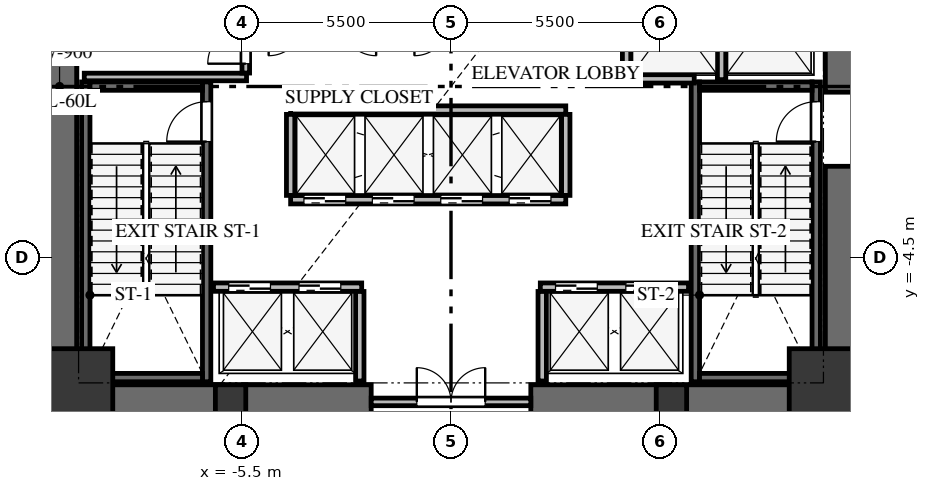
"""IFC4 building model, lengths in metres.
Left out: names, types, materials, properties, quantities, classifications, styles, units other than length and angle.
Written with IfcOpenShell. Run it as: python <this file> out.ifc"""

import sys

from ifc_helpers import new_model, si_unit, direction, frame, frame_2d, origin, origin_2d, place, context, subcontext, project, spatial, rectangle, extrude, source, transform, mapped, element, fill, save


model = new_model("IFC4")
c1 = context("Model", 3, precision=1e-05, world=origin(), true_north=direction((0.0, 1.0)))
c2 = subcontext(c1, "Body", "Model", "MODEL_VIEW")
j1 = project(units=[si_unit("LENGTHUNIT", "METRE"), si_unit("PLANEANGLEUNIT", "RADIAN")], contexts=[c1])
p1 = place(None, origin())
s1 = spatial("IfcSite", under=j1, at=p1, CompositionType="ELEMENT")
p2 = place(p1, origin())
s2 = spatial("IfcBuilding", under=s1, at=p2, CompositionType="ELEMENT")
p3 = place(p2, origin())
s3 = spatial("IfcBuildingStorey", under=s2, at=p3, CompositionType="ELEMENT", Elevation=0.0)
p4 = place(p3, frame((-10.3, -8.75, 0.0), z_axis=(0.0, 0.0, 1.0), x_axis=(0.0, 1.0, 0.0)))
e1 = element("IfcWall", 1, at=p4, inside=s3, PredefinedType="SHEAR", context=c2, shape_type="SweptSolid", body=[
    extrude(rectangle(XDim=17.5, YDim=0.9, at=frame_2d((8.75, 0.0))), origin(), (0.0, 0.0, 1.0), 5.2),
])
p5 = place(p3, frame((10.3, -8.75, 0.0), z_axis=(0.0, 0.0, 1.0), x_axis=(0.0, 1.0, 0.0)))
e2 = element("IfcWall", 2, at=p5, inside=s3, PredefinedType="SHEAR", context=c2, shape_type="SweptSolid", body=[
    extrude(rectangle(XDim=6.65, YDim=0.9, at=frame_2d((3.325, 0.0))), origin(), (0.0, 0.0, 1.0), 5.2),
])
p6 = place(p3, frame((10.3, -0.15, 0.0), z_axis=(0.0, 0.0, 1.0), x_axis=(0.0, 1.0, 0.0)))
e3 = element("IfcWall", 3, at=p6, inside=s3, PredefinedType="SHEAR", context=c2, shape_type="SweptSolid", body=[
    extrude(rectangle(XDim=8.9, YDim=0.9, at=frame_2d((4.45, 0.0))), origin(), (0.0, 0.0, 1.0), 5.2),
])
for number, where, z_axis, x_axis in (
    (4, (-9.85, -8.3, 0.0), (0.0, 0.0, 1.0), (1.0, 0.0, 0.0)),
    (5, (2.1, -8.3, 0.0), (0.0, 0.0, 1.0), (1.0, 0.0, 0.0)),
):
    element("IfcWall", number, at=place(p3, frame(where, z_axis=z_axis, x_axis=x_axis)), inside=s3, PredefinedType="SHEAR", context=c2, shape_type="SweptSolid", body=[
        extrude(rectangle(XDim=7.75, YDim=0.9, at=frame_2d((3.875, 0.0))), origin(), (0.0, 0.0, 1.0), 5.2),
    ])
p7 = place(p3, frame((-6.43, -7.77, -0.3), z_axis=(0.0, 0.0, 1.0), x_axis=(0.0, 1.0, 0.0)))
e6 = element("IfcWall", 6, at=p7, inside=s3, PredefinedType="SHEAR", context=c2, shape_type="SweptSolid", body=[
    extrude(rectangle(XDim=7.89, YDim=0.22, at=frame_2d((3.945, 0.0))), origin(), (0.0, 0.0, 1.0), 5.2),
])
p8 = place(p7, frame((6.32, 0.0, 0.0)))
e7 = element("IfcOpeningElement", 7, at=p8, cuts=e6, PredefinedType="OPENING", context=c2, shape_type="SweptSolid", body=[
    extrude(rectangle(XDim=1.05, YDim=2.15, at=frame_2d((0.525, 1.075))), frame((0.0, 0.12, 0.0), z_axis=(0.0, -1.0, 0.0), x_axis=(1.0, 0.0, 0.0)), (0.0, 0.0, 1.0), 0.24),
])
p9 = place(p3, frame((-9.61, 0.12, -0.3), z_axis=(0.0, 0.0, 1.0), x_axis=(0.0, -1.0, 0.0)))
e8 = element("IfcWall", 8, at=p9, inside=s3, PredefinedType="SHEAR", context=c2, shape_type="SweptSolid", body=[
    extrude(rectangle(XDim=7.89, YDim=0.22, at=frame_2d((3.945, 0.0))), origin(), (0.0, 0.0, 1.0), 5.2),
])
for number, where, z_axis, x_axis in (
    (9, (-9.5, -7.66, -0.3), (0.0, 0.0, 1.0), (1.0, 0.0, 0.0)),
    (10, (-6.54, 0.01, -0.3), (0.0, 0.0, 1.0), (-1.0, 0.0, 0.0)),
):
    element("IfcWall", number, at=place(p3, frame(where, z_axis=z_axis, x_axis=x_axis)), inside=s3, PredefinedType="SHEAR", context=c2, shape_type="SweptSolid", body=[
        extrude(rectangle(XDim=2.96, YDim=0.22, at=frame_2d((1.48, 0.0))), origin(), (0.0, 0.0, 1.0), 5.2),
    ])
p10 = place(p3, frame((9.61, -7.77, -0.3), z_axis=(0.0, 0.0, 1.0), x_axis=(0.0, 1.0, 0.0)))
e11 = element("IfcWall", 11, at=p10, inside=s3, PredefinedType="SHEAR", context=c2, shape_type="SweptSolid", body=[
    extrude(rectangle(XDim=7.89, YDim=0.22, at=frame_2d((3.945, 0.0))), origin(), (0.0, 0.0, 1.0), 5.2),
])
p11 = place(p10, frame((6.32, 0.0, 0.0)))
e12 = element("IfcOpeningElement", 12, at=p11, cuts=e11, PredefinedType="OPENING", context=c2, shape_type="SweptSolid", body=[
    extrude(rectangle(XDim=1.05, YDim=2.15, at=frame_2d((0.525, 1.075))), frame((0.0, 0.12, 0.0), z_axis=(0.0, -1.0, 0.0), x_axis=(1.0, 0.0, 0.0)), (0.0, 0.0, 1.0), 0.24),
])
p12 = place(p3, frame((6.43, 0.12, -0.3), z_axis=(0.0, 0.0, 1.0), x_axis=(0.0, -1.0, 0.0)))
e13 = element("IfcWall", 13, at=p12, inside=s3, PredefinedType="SHEAR", context=c2, shape_type="SweptSolid", body=[
    extrude(rectangle(XDim=7.89, YDim=0.22, at=frame_2d((3.945, 0.0))), origin(), (0.0, 0.0, 1.0), 5.2),
])
for number, where, z_axis, x_axis in (
    (14, (6.54, -7.66, -0.3), (0.0, 0.0, 1.0), (1.0, 0.0, 0.0)),
    (15, (9.5, 0.01, -0.3), (0.0, 0.0, 1.0), (-1.0, 0.0, 0.0)),
):
    element("IfcWall", number, at=place(p3, frame(where, z_axis=z_axis, x_axis=x_axis)), inside=s3, PredefinedType="SHEAR", context=c2, shape_type="SweptSolid", body=[
        extrude(rectangle(XDim=2.96, YDim=0.22, at=frame_2d((1.48, 0.0))), origin(), (0.0, 0.0, 1.0), 5.2),
    ])
m1 = source(origin(), c2, "Body", "SweptSolid", [
    extrude(rectangle(XDim=1.8, YDim=1.8, at=origin_2d()), origin(), (0.0, 0.0, 1.0), 5.2),
])
for number, where, z_axis, x_axis in (
    (16, (-9.8, -7.8, -0.3), (0.0, 0.0, 1.0), (1.0, 0.0, 0.0)),
    (17, (9.8, -7.8, -0.3), (0.0, 0.0, 1.0), (1.0, 0.0, 0.0)),
):
    element("IfcColumn", number, at=place(p3, frame(where, z_axis=z_axis, x_axis=x_axis)), inside=s3, PredefinedType="COLUMN", context=c2, shape_type="MappedRepresentation", body=[
        mapped(m1, transform((0.0, 0.0, 0.0), x_axis=(1.0, 0.0, 0.0), y_axis=(0.0, 1.0, 0.0), z_axis=(0.0, 0.0, 1.0), scale=1.0)),
    ])
m2 = source(origin(), c2, "Body", "SweptSolid", [
    extrude(rectangle(XDim=0.8, YDim=0.8, at=origin_2d()), origin(), (0.0, 0.0, 1.0), 5.2),
])
for number, where, z_axis, x_axis in (
    (18, (-5.8, -8.25, -0.3), (0.0, 0.0, 1.0), (1.0, 0.0, 0.0)),
    (19, (5.8, -8.25, -0.3), (0.0, 0.0, 1.0), (1.0, 0.0, 0.0)),
):
    element("IfcColumn", number, at=place(p3, frame(where, z_axis=z_axis, x_axis=x_axis)), inside=s3, PredefinedType="PILASTER", context=c2, shape_type="MappedRepresentation", body=[
        mapped(m2, transform((0.0, 0.0, 0.0), x_axis=(1.0, 0.0, 0.0), y_axis=(0.0, 1.0, 0.0), z_axis=(0.0, 0.0, 1.0), scale=1.0)),
    ])
p13 = place(p3, frame((20.589, -1.538, 0.0), z_axis=(0.0, 0.0, 1.0), x_axis=(-0.603015201292, -0.797729695455, 0.0)))
e20 = element("IfcWall", 20, at=p13, inside=s3, PredefinedType="SOLIDWALL", context=c2, shape_type="SweptSolid", body=[
    extrude(rectangle(XDim=16.65, YDim=0.3, at=frame_2d((8.325, 0.0))), origin(), (0.0, 0.0, 1.0), 4.9),
])
p14 = place(p13, frame((4.2, 0.0, 0.0)))
e21 = element("IfcOpeningElement", 21, at=p14, cuts=e20, PredefinedType="OPENING", context=c2, shape_type="SweptSolid", body=[
    extrude(rectangle(XDim=2.0, YDim=2.3, at=frame_2d((1.0, 1.15))), frame((0.0, 0.16, 0.0), z_axis=(0.0, -1.0, 0.0), x_axis=(1.0, 0.0, 0.0)), (0.0, 0.0, 1.0), 0.32),
])
p15 = place(p3, frame((-2.1, -8.3, 0.0), z_axis=(0.0, 0.0, 1.0), x_axis=(1.0, 0.0, 0.0)))
e22 = element("IfcWall", 22, at=p15, inside=s3, PredefinedType="SOLIDWALL", context=c2, shape_type="SweptSolid", body=[
    extrude(rectangle(XDim=4.2, YDim=0.2, at=frame_2d((2.1, 0.0))), origin(), (0.0, 0.0, 1.0), 4.885),
])
p16 = place(p15, frame((1.2, 0.0, 0.0)))
e23 = element("IfcOpeningElement", 23, at=p16, cuts=e22, PredefinedType="OPENING", context=c2, shape_type="SweptSolid", body=[
    extrude(rectangle(XDim=1.8, YDim=2.15, at=frame_2d((0.9, 1.075))), frame((0.0, 0.11, 0.0), z_axis=(0.0, -1.0, 0.0), x_axis=(1.0, 0.0, 0.0)), (0.0, 0.0, 1.0), 0.22),
])
p17 = place(p3, frame((-9.65, 0.25, 0.0), z_axis=(0.0, 0.0, 1.0), x_axis=(1.0, 0.0, 0.0)))
e24 = element("IfcWall", 24, at=p17, inside=s3, PredefinedType="SOLIDWALL", context=c2, shape_type="SweptSolid", body=[
    extrude(rectangle(XDim=4.27, YDim=0.2, at=frame_2d((2.135, 0.0))), origin(), (0.0, 0.0, 1.0), 4.885),
])
p18 = place(p3, frame((-5.4, 0.354, 0.0), z_axis=(0.0, 0.0, 1.0), x_axis=(0.0, 1.0, 0.0)))
e25 = element("IfcWall", 25, at=p18, inside=s3, PredefinedType="SOLIDWALL", context=c2, shape_type="SweptSolid", body=[
    extrude(rectangle(XDim=4.026, YDim=0.2, at=frame_2d((2.013, 0.0))), origin(), (0.0, 0.0, 1.0), 4.885),
])
p19 = place(p18, frame((0.246, 0.0, 0.0)))
e26 = element("IfcOpeningElement", 26, at=p19, cuts=e25, PredefinedType="OPENING", context=c2, shape_type="SweptSolid", body=[
    extrude(rectangle(XDim=1.0, YDim=2.15, at=frame_2d((0.5, 1.075))), frame((0.0, 0.11, 0.0), z_axis=(0.0, -1.0, 0.0), x_axis=(1.0, 0.0, 0.0)), (0.0, 0.0, 1.0), 0.22),
])
for number, where, z_axis, x_axis in (
    (27, (4.62, 0.18, 0.0), (0.0, 0.0, 1.0), (0.0, 1.0, 0.0)),
    (28, (7.12, 0.18, 0.0), (0.0, 0.0, 1.0), (0.0, 1.0, 0.0)),
):
    element("IfcWall", number, at=place(p3, frame(where, z_axis=z_axis, x_axis=x_axis)), inside=s3, PredefinedType="SOLIDWALL", context=c2, shape_type="SweptSolid", body=[
        extrude(rectangle(XDim=3.186, YDim=0.22, at=frame_2d((1.593, 0.0))), origin(), (0.0, 0.0, 1.0), 4.885),
    ])
p20 = place(p3, frame((4.734, 0.2, 0.0), z_axis=(0.0, 0.0, 1.0), x_axis=(1.0, 0.0, 0.0)))
e29 = element("IfcWall", 29, at=p20, inside=s3, PredefinedType="SOLIDWALL", context=c2, shape_type="SweptSolid", body=[
    extrude(rectangle(XDim=1.666, YDim=0.22, at=frame_2d((0.833, 0.0))), origin(), (0.0, 0.0, 1.0), 4.885),
])
p21 = place(p3, frame((-6.25, -5.28, 0.0), z_axis=(0.0, 0.0, 1.0), x_axis=(1.0, 0.0, 0.0)))
e30 = element("IfcWall", 30, at=p21, inside=s3, PredefinedType="SOLIDWALL", context=c2, shape_type="SweptSolid", body=[
    extrude(rectangle(XDim=3.9, YDim=0.22, at=frame_2d((1.95, 0.0))), origin(), (0.0, 0.0, 1.0), 4.885),
])
p22 = place(p21, frame((0.4, 0.0, 0.0)))
e31 = element("IfcOpeningElement", 31, at=p22, cuts=e30, PredefinedType="OPENING", context=c2, shape_type="SweptSolid", body=[
    extrude(rectangle(XDim=1.1, YDim=2.15, at=frame_2d((0.55, 1.075))), frame((0.0, 0.12, 0.0), z_axis=(0.0, -1.0, 0.0), x_axis=(1.0, 0.0, 0.0)), (0.0, 0.0, 1.0), 0.24),
])
p23 = place(p21, frame((2.25, 0.0, 0.0)))
e32 = element("IfcOpeningElement", 32, at=p23, cuts=e30, PredefinedType="OPENING", context=c2, shape_type="SweptSolid", body=[
    extrude(rectangle(XDim=1.1, YDim=2.15, at=frame_2d((0.55, 1.075))), frame((0.0, 0.12, 0.0), z_axis=(0.0, -1.0, 0.0), x_axis=(1.0, 0.0, 0.0)), (0.0, 0.0, 1.0), 0.24),
])
p24 = place(p3, frame((2.35, -5.28, 0.0), z_axis=(0.0, 0.0, 1.0), x_axis=(1.0, 0.0, 0.0)))
e33 = element("IfcWall", 33, at=p24, inside=s3, PredefinedType="SOLIDWALL", context=c2, shape_type="SweptSolid", body=[
    extrude(rectangle(XDim=3.9, YDim=0.22, at=frame_2d((1.95, 0.0))), origin(), (0.0, 0.0, 1.0), 4.885),
])
p25 = place(p24, frame((0.4, 0.0, 0.0)))
e34 = element("IfcOpeningElement", 34, at=p25, cuts=e33, PredefinedType="OPENING", context=c2, shape_type="SweptSolid", body=[
    extrude(rectangle(XDim=1.1, YDim=2.15, at=frame_2d((0.55, 1.075))), frame((0.0, 0.12, 0.0), z_axis=(0.0, -1.0, 0.0), x_axis=(1.0, 0.0, 0.0)), (0.0, 0.0, 1.0), 0.24),
])
p26 = place(p24, frame((2.25, 0.0, 0.0)))
e35 = element("IfcOpeningElement", 35, at=p26, cuts=e33, PredefinedType="OPENING", context=c2, shape_type="SweptSolid", body=[
    extrude(rectangle(XDim=1.1, YDim=2.15, at=frame_2d((0.55, 1.075))), frame((0.0, 0.12, 0.0), z_axis=(0.0, -1.0, 0.0), x_axis=(1.0, 0.0, 0.0)), (0.0, 0.0, 1.0), 0.24),
])
for number, where, z_axis, x_axis in (
    (36, (-2.4, -7.75, 0.0), (0.0, 0.0, 1.0), (0.0, 1.0, 0.0)),
    (37, (2.4, -7.75, 0.0), (0.0, 0.0, 1.0), (0.0, 1.0, 0.0)),
):
    element("IfcWall", number, at=place(p3, frame(where, z_axis=z_axis, x_axis=x_axis)), inside=s3, PredefinedType="SOLIDWALL", context=c2, shape_type="SweptSolid", body=[
        extrude(rectangle(XDim=2.356, YDim=0.22, at=frame_2d((1.178, 0.0))), origin(), (0.0, 0.0, 1.0), 4.885),
    ])
p27 = place(p3, frame((-4.22, -2.98, 0.0), z_axis=(0.0, 0.0, 1.0), x_axis=(1.0, 0.0, 0.0)))
e38 = element("IfcWall", 38, at=p27, inside=s3, PredefinedType="SOLIDWALL", context=c2, shape_type="SweptSolid", body=[
    extrude(rectangle(XDim=7.24, YDim=0.22, at=frame_2d((3.62, 0.0))), origin(), (0.0, 0.0, 1.0), 4.885),
])
p28 = place(p27, frame((0.35, 0.0, 0.0)))
e39 = element("IfcOpeningElement", 39, at=p28, cuts=e38, PredefinedType="OPENING", context=c2, shape_type="SweptSolid", body=[
    extrude(rectangle(XDim=1.1, YDim=2.15, at=frame_2d((0.55, 1.075))), frame((0.0, 0.12, 0.0), z_axis=(0.0, -1.0, 0.0), x_axis=(1.0, 0.0, 0.0)), (0.0, 0.0, 1.0), 0.24),
])
p29 = place(p27, frame((2.15, 0.0, 0.0)))
e40 = element("IfcOpeningElement", 40, at=p29, cuts=e38, PredefinedType="OPENING", context=c2, shape_type="SweptSolid", body=[
    extrude(rectangle(XDim=1.1, YDim=2.15, at=frame_2d((0.55, 1.075))), frame((0.0, 0.12, 0.0), z_axis=(0.0, -1.0, 0.0), x_axis=(1.0, 0.0, 0.0)), (0.0, 0.0, 1.0), 0.24),
])
p30 = place(p27, frame((3.95, 0.0, 0.0)))
e41 = element("IfcOpeningElement", 41, at=p30, cuts=e38, PredefinedType="OPENING", context=c2, shape_type="SweptSolid", body=[
    extrude(rectangle(XDim=1.1, YDim=2.15, at=frame_2d((0.55, 1.075))), frame((0.0, 0.12, 0.0), z_axis=(0.0, -1.0, 0.0), x_axis=(1.0, 0.0, 0.0)), (0.0, 0.0, 1.0), 0.24),
])
p31 = place(p27, frame((5.75, 0.0, 0.0)))
e42 = element("IfcOpeningElement", 42, at=p31, cuts=e38, PredefinedType="OPENING", context=c2, shape_type="SweptSolid", body=[
    extrude(rectangle(XDim=1.1, YDim=2.15, at=frame_2d((0.55, 1.075))), frame((0.0, 0.12, 0.0), z_axis=(0.0, -1.0, 0.0), x_axis=(1.0, 0.0, 0.0)), (0.0, 0.0, 1.0), 0.24),
])
p32 = place(p3, frame((-4.22, -0.62, 0.0), z_axis=(0.0, 0.0, 1.0), x_axis=(1.0, 0.0, 0.0)))
e43 = element("IfcWall", 43, at=p32, inside=s3, PredefinedType="SOLIDWALL", context=c2, shape_type="SweptSolid", body=[
    extrude(rectangle(XDim=7.24, YDim=0.22, at=frame_2d((3.62, 0.0))), origin(), (0.0, 0.0, 1.0), 4.885),
])
for number, where, z_axis, x_axis in (
    (44, (-4.22, -2.866, 0.0), (0.0, 0.0, 1.0), (0.0, 1.0, 0.0)),
    (45, (3.02, -2.866, 0.0), (0.0, 0.0, 1.0), (0.0, 1.0, 0.0)),
):
    element("IfcWall", number, at=place(p3, frame(where, z_axis=z_axis, x_axis=x_axis)), inside=s3, PredefinedType="SOLIDWALL", context=c2, shape_type="SweptSolid", body=[
        extrude(rectangle(XDim=2.132, YDim=0.22, at=frame_2d((1.066, 0.0))), origin(), (0.0, 0.0, 1.0), 4.885),
    ])
m3 = source(origin(), c2, "Body", "SweptSolid", [
    extrude(rectangle(XDim=1.05, YDim=2.15, at=frame_2d((0.525, 1.075))), frame((0.0, 0.025, 0.0), z_axis=(0.0, -1.0, 0.0), x_axis=(1.0, 0.0, 0.0)), (0.0, 0.0, 1.0), 0.05),
])
p33 = place(p8, origin())
e46 = element("IfcDoor", 46, at=p33, inside=s3, OperationType="SINGLE_SWING_LEFT", PredefinedType="DOOR", context=c2, shape_type="MappedRepresentation", body=[
    mapped(m3, transform((0.0, 0.0, 0.0), x_axis=(1.0, 0.0, 0.0), y_axis=(0.0, 1.0, 0.0), z_axis=(0.0, 0.0, 1.0), scale=1.0)),
])
fill(e7, e46)
p34 = place(p11, origin())
e47 = element("IfcDoor", 47, at=p34, inside=s3, OperationType="SINGLE_SWING_LEFT", PredefinedType="DOOR", context=c2, shape_type="MappedRepresentation", body=[
    mapped(m3, transform((0.0, 0.0, 0.0), x_axis=(1.0, 0.0, 0.0), y_axis=(0.0, 1.0, 0.0), z_axis=(0.0, 0.0, 1.0), scale=1.0)),
])
fill(e12, e47)
m4 = source(origin(), c2, "Body", "SweptSolid", [
    extrude(rectangle(XDim=1.8, YDim=2.15, at=frame_2d((0.9, 1.075))), frame((0.0, 0.025, 0.0), z_axis=(0.0, -1.0, 0.0), x_axis=(1.0, 0.0, 0.0)), (0.0, 0.0, 1.0), 0.05),
])
p35 = place(p16, origin())
e48 = element("IfcDoor", 48, at=p35, inside=s3, OperationType="DOUBLE_DOOR_SINGLE_SWING", PredefinedType="DOOR", context=c2, shape_type="MappedRepresentation", body=[
    mapped(m4, transform((0.0, 0.0, 0.0), x_axis=(1.0, 0.0, 0.0), y_axis=(0.0, 1.0, 0.0), z_axis=(0.0, 0.0, 1.0), scale=1.0)),
])
fill(e23, e48)
m5 = source(origin(), c2, "Body", "SweptSolid", [
    extrude(rectangle(XDim=1.0, YDim=2.15, at=frame_2d((0.5, 1.075))), frame((0.0, 0.025, 0.0), z_axis=(0.0, -1.0, 0.0), x_axis=(1.0, 0.0, 0.0)), (0.0, 0.0, 1.0), 0.05),
])
p36 = place(p19, origin())
e49 = element("IfcDoor", 49, at=p36, inside=s3, OperationType="SINGLE_SWING_LEFT", PredefinedType="DOOR", context=c2, shape_type="MappedRepresentation", body=[
    mapped(m5, transform((0.0, 0.0, 0.0), x_axis=(1.0, 0.0, 0.0), y_axis=(0.0, 1.0, 0.0), z_axis=(0.0, 0.0, 1.0), scale=1.0)),
])
fill(e26, e49)
m6 = source(origin(), c2, "Body", "SweptSolid", [
    extrude(rectangle(XDim=1.1, YDim=2.15, at=frame_2d((0.55, 1.075))), frame((0.0, 0.025, 0.0), z_axis=(0.0, -1.0, 0.0), x_axis=(1.0, 0.0, 0.0)), (0.0, 0.0, 1.0), 0.05),
])
p37 = place(p22, origin())
e50 = element("IfcDoor", 50, at=p37, inside=s3, OperationType="DOUBLE_DOOR_SLIDING", PredefinedType="DOOR", context=c2, shape_type="MappedRepresentation", body=[
    mapped(m6, transform((0.0, 0.0, 0.0), x_axis=(1.0, 0.0, 0.0), y_axis=(0.0, 1.0, 0.0), z_axis=(0.0, 0.0, 1.0), scale=1.0)),
])
fill(e31, e50)
p38 = place(p23, origin())
e51 = element("IfcDoor", 51, at=p38, inside=s3, OperationType="DOUBLE_DOOR_SLIDING", PredefinedType="DOOR", context=c2, shape_type="MappedRepresentation", body=[
    mapped(m6, transform((0.0, 0.0, 0.0), x_axis=(1.0, 0.0, 0.0), y_axis=(0.0, 1.0, 0.0), z_axis=(0.0, 0.0, 1.0), scale=1.0)),
])
fill(e32, e51)
p39 = place(p25, origin())
e52 = element("IfcDoor", 52, at=p39, inside=s3, OperationType="DOUBLE_DOOR_SLIDING", PredefinedType="DOOR", context=c2, shape_type="MappedRepresentation", body=[
    mapped(m6, transform((0.0, 0.0, 0.0), x_axis=(1.0, 0.0, 0.0), y_axis=(0.0, 1.0, 0.0), z_axis=(0.0, 0.0, 1.0), scale=1.0)),
])
fill(e34, e52)
p40 = place(p26, origin())
e53 = element("IfcDoor", 53, at=p40, inside=s3, OperationType="DOUBLE_DOOR_SLIDING", PredefinedType="DOOR", context=c2, shape_type="MappedRepresentation", body=[
    mapped(m6, transform((0.0, 0.0, 0.0), x_axis=(1.0, 0.0, 0.0), y_axis=(0.0, 1.0, 0.0), z_axis=(0.0, 0.0, 1.0), scale=1.0)),
])
fill(e35, e53)
p41 = place(p28, origin())
e54 = element("IfcDoor", 54, at=p41, inside=s3, OperationType="DOUBLE_DOOR_SLIDING", PredefinedType="DOOR", context=c2, shape_type="MappedRepresentation", body=[
    mapped(m6, transform((0.0, 0.0, 0.0), x_axis=(1.0, 0.0, 0.0), y_axis=(0.0, 1.0, 0.0), z_axis=(0.0, 0.0, 1.0), scale=1.0)),
])
fill(e39, e54)
p42 = place(p29, origin())
e55 = element("IfcDoor", 55, at=p42, inside=s3, OperationType="DOUBLE_DOOR_SLIDING", PredefinedType="DOOR", context=c2, shape_type="MappedRepresentation", body=[
    mapped(m6, transform((0.0, 0.0, 0.0), x_axis=(1.0, 0.0, 0.0), y_axis=(0.0, 1.0, 0.0), z_axis=(0.0, 0.0, 1.0), scale=1.0)),
])
fill(e40, e55)
p43 = place(p30, origin())
e56 = element("IfcDoor", 56, at=p43, inside=s3, OperationType="DOUBLE_DOOR_SLIDING", PredefinedType="DOOR", context=c2, shape_type="MappedRepresentation", body=[
    mapped(m6, transform((0.0, 0.0, 0.0), x_axis=(1.0, 0.0, 0.0), y_axis=(0.0, 1.0, 0.0), z_axis=(0.0, 0.0, 1.0), scale=1.0)),
])
fill(e41, e56)
p44 = place(p31, origin())
e57 = element("IfcDoor", 57, at=p44, inside=s3, OperationType="DOUBLE_DOOR_SLIDING", PredefinedType="DOOR", context=c2, shape_type="MappedRepresentation", body=[
    mapped(m6, transform((0.0, 0.0, 0.0), x_axis=(1.0, 0.0, 0.0), y_axis=(0.0, 1.0, 0.0), z_axis=(0.0, 0.0, 1.0), scale=1.0)),
])
fill(e42, e57)
save(model, sys.argv[1])
